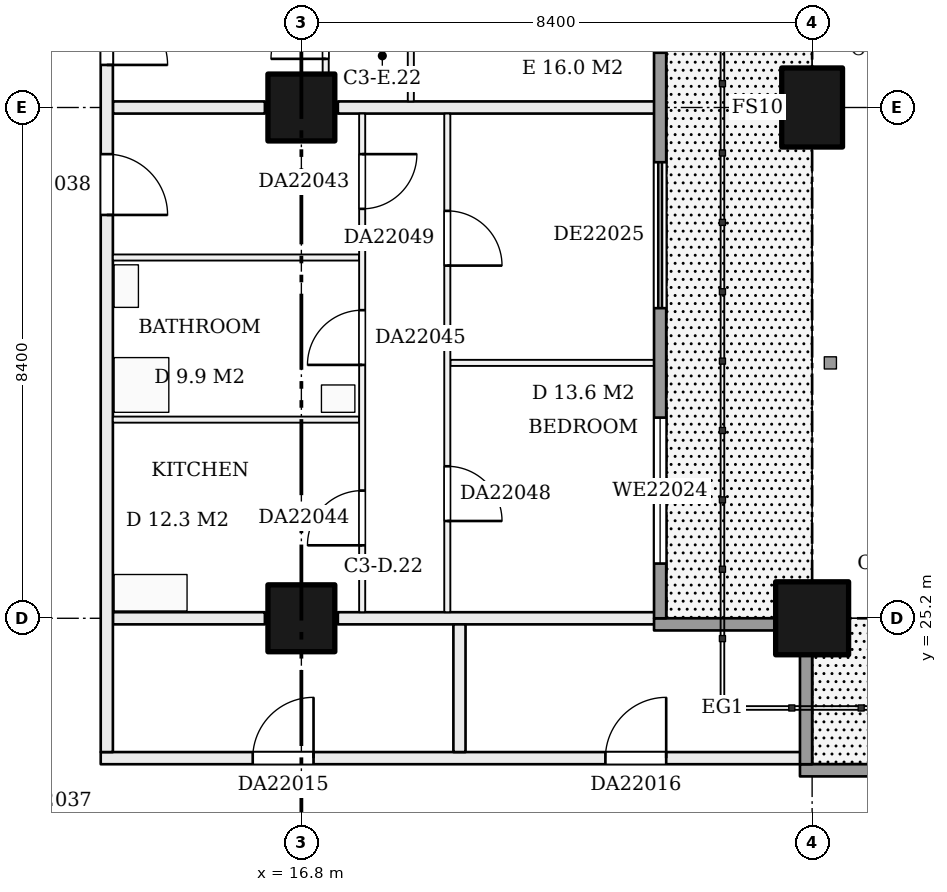
"""IFC4 building model, lengths in metres.
Left out: names, types, materials, properties, quantities, classifications, styles, units other than length and angle.
Written with IfcOpenShell. Run it as: python <this file> out.ifc"""

import sys

from ifc_helpers import new_model, si_unit, direction, frame, frame_2d, origin, origin_2d, place, context, subcontext, project, spatial, rectangle, extrude, element, fill, save


model = new_model("IFC4")
c1 = context("Model", 3, precision=1e-05, world=origin(), true_north=direction((0.0, 1.0)))
c2 = subcontext(c1, "Body", "Model", "MODEL_VIEW")
j1 = project(units=[si_unit("LENGTHUNIT", "METRE"), si_unit("PLANEANGLEUNIT", "RADIAN")], contexts=[c1])
p1 = place(None, origin())
s1 = spatial("IfcSite", under=j1, at=p1, CompositionType="ELEMENT")
p2 = place(p1, origin())
s2 = spatial("IfcBuilding", under=s1, at=p2, CompositionType="ELEMENT")
p3 = place(p2, frame((0.0, 0.0, 91.7)))
s3 = spatial("IfcBuildingStorey", under=s2, at=p3, CompositionType="ELEMENT", Elevation=91.7)
for number, where, z_axis, x_axis in (
    (1, (16.8, 25.2, 0.0), (0.0, 0.0, 1.0), (1.0, 0.0, 0.0)),
    (2, (16.8, 33.6, 0.0), (0.0, 0.0, 1.0), (1.0, 0.0, 0.0)),
):
    element("IfcColumn", number, at=place(p3, frame(where, z_axis=z_axis, x_axis=x_axis)), inside=s3, PredefinedType="COLUMN", context=c2, shape_type="SweptSolid", body=[
        extrude(rectangle(XDim=1.1, YDim=1.1, at=origin_2d()), origin(), (0.0, 0.0, 1.0), 3.22),
    ])
p4 = place(p3, frame((25.2, 25.2, 0.0), z_axis=(0.0, 0.0, 1.0), x_axis=(1.0, 0.0, 0.0)))
e3 = element("IfcColumn", 3, at=p4, inside=s3, PredefinedType="COLUMN", context=c2, shape_type="SweptSolid", body=[
    extrude(rectangle(XDim=1.2, YDim=1.2, at=origin_2d()), origin(), (0.0, 0.0, 1.0), 3.22),
])
p5 = place(p3, frame((25.2, 33.6, 0.0), z_axis=(0.0, 0.0, 1.0), x_axis=(0.0, 1.0, 0.0)))
e4 = element("IfcColumn", 4, at=p5, inside=s3, PredefinedType="COLUMN", context=c2, shape_type="SweptSolid", body=[
    extrude(rectangle(XDim=1.3, YDim=1.0, at=origin_2d()), origin(), (0.0, 0.0, 1.0), 3.22),
])
p6 = place(p3, frame((13.5, 22.9, 0.0), z_axis=(0.0, 0.0, 1.0), x_axis=(1.0, 0.0, 0.0)))
e5 = element("IfcWall", 5, at=p6, inside=s3, PredefinedType="PARTITIONING", context=c2, shape_type="SweptSolid", body=[
    extrude(rectangle(XDim=11.6, YDim=0.2, at=frame_2d((5.8, 0.0))), origin(), (0.0, 0.0, 1.0), 3.22),
])
p7 = place(p6, frame((2.5, 0.0, 0.0)))
e6 = element("IfcOpeningElement", 6, at=p7, cuts=e5, PredefinedType="OPENING", context=c2, shape_type="SweptSolid", body=[
    extrude(rectangle(XDim=1.0, YDim=2.1, at=frame_2d((0.5, 1.05))), frame((0.0, 0.11, 0.0), z_axis=(0.0, -1.0, 0.0), x_axis=(1.0, 0.0, 0.0)), (0.0, 0.0, 1.0), 0.22),
])
p8 = place(p6, frame((8.3, 0.0, 0.0)))
e7 = element("IfcOpeningElement", 7, at=p8, cuts=e5, PredefinedType="OPENING", context=c2, shape_type="SweptSolid", body=[
    extrude(rectangle(XDim=1.0, YDim=2.1, at=frame_2d((0.5, 1.05))), frame((0.0, 0.11, 0.0), z_axis=(0.0, -1.0, 0.0), x_axis=(1.0, 0.0, 0.0)), (0.0, 0.0, 1.0), 0.22),
])
p9 = place(p3, frame((13.7, 25.2, 0.0), z_axis=(0.0, 0.0, 1.0), x_axis=(1.0, 0.0, 0.0)))
e8 = element("IfcWall", 8, at=p9, inside=s3, PredefinedType="PARTITIONING", context=c2, shape_type="SweptSolid", body=[
    extrude(rectangle(XDim=2.5, YDim=0.2, at=frame_2d((1.25, 0.0))), origin(), (0.0, 0.0, 1.0), 3.22),
])
p10 = place(p3, frame((17.4, 25.2, 0.0), z_axis=(0.0, 0.0, 1.0), x_axis=(1.0, 0.0, 0.0)))
e9 = element("IfcWall", 9, at=p10, inside=s3, PredefinedType="PARTITIONING", context=c2, shape_type="SweptSolid", body=[
    extrude(rectangle(XDim=5.3, YDim=0.2, at=frame_2d((2.65, 0.0))), origin(), (0.0, 0.0, 1.0), 3.22),
])
p11 = place(p3, frame((13.7, 28.467, 0.0), z_axis=(0.0, 0.0, 1.0), x_axis=(1.0, 0.0, 0.0)))
e10 = element("IfcWall", 10, at=p11, inside=s3, PredefinedType="PARTITIONING", context=c2, shape_type="SweptSolid", body=[
    extrude(rectangle(XDim=4.05, YDim=0.1, at=frame_2d((2.025, 0.0))), origin(), (0.0, 0.0, 1.0), 3.22),
])
p12 = place(p3, frame((19.25, 29.4, 0.0), z_axis=(0.0, 0.0, 1.0), x_axis=(1.0, 0.0, 0.0)))
e11 = element("IfcWall", 11, at=p12, inside=s3, PredefinedType="PARTITIONING", context=c2, shape_type="SweptSolid", body=[
    extrude(rectangle(XDim=3.45, YDim=0.1, at=frame_2d((1.725, 0.0))), origin(), (0.0, 0.0, 1.0), 3.22),
])
p13 = place(p3, frame((13.7, 31.133, 0.0), z_axis=(0.0, 0.0, 1.0), x_axis=(1.0, 0.0, 0.0)))
e12 = element("IfcWall", 12, at=p13, inside=s3, PredefinedType="PARTITIONING", context=c2, shape_type="SweptSolid", body=[
    extrude(rectangle(XDim=4.05, YDim=0.1, at=frame_2d((2.025, 0.0))), origin(), (0.0, 0.0, 1.0), 3.22),
])
p14 = place(p3, frame((13.7, 33.6, 0.0), z_axis=(0.0, 0.0, 1.0), x_axis=(1.0, 0.0, 0.0)))
e13 = element("IfcWall", 13, at=p14, inside=s3, PredefinedType="PARTITIONING", context=c2, shape_type="SweptSolid", body=[
    extrude(rectangle(XDim=2.5, YDim=0.2, at=frame_2d((1.25, 0.0))), origin(), (0.0, 0.0, 1.0), 3.22),
])
p15 = place(p3, frame((17.4, 33.6, 0.0), z_axis=(0.0, 0.0, 1.0), x_axis=(1.0, 0.0, 0.0)))
e14 = element("IfcWall", 14, at=p15, inside=s3, PredefinedType="PARTITIONING", context=c2, shape_type="SweptSolid", body=[
    extrude(rectangle(XDim=5.3, YDim=0.2, at=frame_2d((2.65, 0.0))), origin(), (0.0, 0.0, 1.0), 3.22),
])
p16 = place(p3, frame((13.6, 23.0, 0.0), z_axis=(0.0, 0.0, 1.0), x_axis=(0.0, 1.0, 0.0)))
e15 = element("IfcWall", 15, at=p16, inside=s3, PredefinedType="PARTITIONING", context=c2, shape_type="SweptSolid", body=[
    extrude(rectangle(XDim=19.0, YDim=0.2, at=frame_2d((9.5, 0.0))), origin(), (0.0, 0.0, 1.0), 3.22),
])
p17 = place(p16, frame((8.833, 0.0, 0.0)))
e16 = element("IfcOpeningElement", 16, at=p17, cuts=e15, PredefinedType="OPENING", context=c2, shape_type="SweptSolid", body=[
    extrude(rectangle(XDim=1.0, YDim=2.1, at=frame_2d((0.5, 1.05))), frame((0.0, 0.11, 0.0), z_axis=(0.0, -1.0, 0.0), x_axis=(1.0, 0.0, 0.0)), (0.0, 0.0, 1.0), 0.22),
])
p18 = place(p16, frame((11.3, 0.0, 0.0)))
e17 = element("IfcOpeningElement", 17, at=p18, cuts=e15, PredefinedType="OPENING", context=c2, shape_type="SweptSolid", body=[
    extrude(rectangle(XDim=1.0, YDim=2.1, at=frame_2d((0.5, 1.05))), frame((0.0, 0.11, 0.0), z_axis=(0.0, -1.0, 0.0), x_axis=(1.0, 0.0, 0.0)), (0.0, 0.0, 1.0), 0.22),
])
p19 = place(p3, frame((17.2, 33.7, 0.0), z_axis=(0.0, 0.0, 1.0), x_axis=(0.0, 1.0, 0.0)))
e18 = element("IfcWall", 18, at=p19, inside=s3, PredefinedType="PARTITIONING", context=c2, shape_type="SweptSolid", body=[
    extrude(rectangle(XDim=8.3, YDim=0.1, at=frame_2d((4.15, 0.0))), origin(), (0.0, 0.0, 1.0), 3.22),
])
p20 = place(p19, frame((0.7, 0.0, 0.0)))
e19 = element("IfcOpeningElement", 19, at=p20, cuts=e18, PredefinedType="OPENING", context=c2, shape_type="SweptSolid", body=[
    extrude(rectangle(XDim=0.9, YDim=2.1, at=frame_2d((0.45, 1.05))), frame((0.0, 0.06, 0.0), z_axis=(0.0, -1.0, 0.0), x_axis=(1.0, 0.0, 0.0)), (0.0, 0.0, 1.0), 0.12),
])
p21 = place(p19, frame((3.567, 0.0, 0.0)))
e20 = element("IfcOpeningElement", 20, at=p21, cuts=e18, PredefinedType="OPENING", context=c2, shape_type="SweptSolid", body=[
    extrude(rectangle(XDim=0.9, YDim=2.1, at=frame_2d((0.45, 1.05))), frame((0.0, 0.06, 0.0), z_axis=(0.0, -1.0, 0.0), x_axis=(1.0, 0.0, 0.0)), (0.0, 0.0, 1.0), 0.12),
])
p22 = place(p19, frame((6.533, 0.0, 0.0)))
e21 = element("IfcOpeningElement", 21, at=p22, cuts=e18, PredefinedType="OPENING", context=c2, shape_type="SweptSolid", body=[
    extrude(rectangle(XDim=0.9, YDim=2.1, at=frame_2d((0.45, 1.05))), frame((0.0, 0.06, 0.0), z_axis=(0.0, -1.0, 0.0), x_axis=(1.0, 0.0, 0.0)), (0.0, 0.0, 1.0), 0.12),
])
p23 = place(p3, frame((17.8, 25.3, 0.0), z_axis=(0.0, 0.0, 1.0), x_axis=(0.0, 1.0, 0.0)))
e22 = element("IfcWall", 22, at=p23, inside=s3, PredefinedType="PARTITIONING", context=c2, shape_type="SweptSolid", body=[
    extrude(rectangle(XDim=8.2, YDim=0.1, at=frame_2d((4.1, 0.0))), origin(), (0.0, 0.0, 1.0), 3.22),
])
p24 = place(p23, frame((6.633, 0.0, 0.0)))
e23 = element("IfcOpeningElement", 23, at=p24, cuts=e22, PredefinedType="OPENING", context=c2, shape_type="SweptSolid", body=[
    extrude(rectangle(XDim=0.9, YDim=2.1, at=frame_2d((0.45, 1.05))), frame((0.0, 0.06, 0.0), z_axis=(0.0, -1.0, 0.0), x_axis=(1.0, 0.0, 0.0)), (0.0, 0.0, 1.0), 0.12),
])
p25 = place(p23, frame((1.1, 0.0, 0.0)))
e24 = element("IfcOpeningElement", 24, at=p25, cuts=e22, PredefinedType="OPENING", context=c2, shape_type="SweptSolid", body=[
    extrude(rectangle(XDim=0.9, YDim=2.1, at=frame_2d((0.45, 1.05))), frame((0.0, 0.06, 0.0), z_axis=(0.0, -1.0, 0.0), x_axis=(1.0, 0.0, 0.0)), (0.0, 0.0, 1.0), 0.12),
])
p26 = place(p23, frame((4.067, 0.0, 0.0)))
e25 = element("IfcOpeningElement", 25, at=p26, cuts=e22, PredefinedType="OPENING", context=c2, shape_type="SweptSolid", body=[
    extrude(rectangle(XDim=0.9, YDim=2.1, at=frame_2d((0.45, 1.05))), frame((0.0, 0.06, 0.0), z_axis=(0.0, -1.0, 0.0), x_axis=(1.0, 0.0, 0.0)), (0.0, 0.0, 1.0), 0.12),
])
p27 = place(p3, frame((18.6, 33.7, 0.0), z_axis=(0.0, 0.0, 1.0), x_axis=(0.0, 1.0, 0.0)))
e26 = element("IfcWall", 26, at=p27, inside=s3, PredefinedType="PARTITIONING", context=c2, shape_type="SweptSolid", body=[
    extrude(rectangle(XDim=8.3, YDim=0.1, at=frame_2d((4.15, 0.0))), origin(), (0.0, 0.0, 1.0), 3.22),
])
p28 = place(p27, frame((1.5, 0.0, 0.0)))
e27 = element("IfcOpeningElement", 27, at=p28, cuts=e26, PredefinedType="OPENING", context=c2, shape_type="SweptSolid", body=[
    extrude(rectangle(XDim=0.9, YDim=2.1, at=frame_2d((0.45, 1.05))), frame((0.0, 0.06, 0.0), z_axis=(0.0, -1.0, 0.0), x_axis=(1.0, 0.0, 0.0)), (0.0, 0.0, 1.0), 0.12),
])
p29 = place(p27, frame((5.7, 0.0, 0.0)))
e28 = element("IfcOpeningElement", 28, at=p29, cuts=e26, PredefinedType="OPENING", context=c2, shape_type="SweptSolid", body=[
    extrude(rectangle(XDim=0.9, YDim=2.1, at=frame_2d((0.45, 1.05))), frame((0.0, 0.06, 0.0), z_axis=(0.0, -1.0, 0.0), x_axis=(1.0, 0.0, 0.0)), (0.0, 0.0, 1.0), 0.12),
])
p30 = place(p3, frame((19.2, 25.3, 0.0), z_axis=(0.0, 0.0, 1.0), x_axis=(0.0, 1.0, 0.0)))
e29 = element("IfcWall", 29, at=p30, inside=s3, PredefinedType="PARTITIONING", context=c2, shape_type="SweptSolid", body=[
    extrude(rectangle(XDim=8.2, YDim=0.1, at=frame_2d((4.1, 0.0))), origin(), (0.0, 0.0, 1.0), 3.22),
])
p31 = place(p30, frame((1.5, 0.0, 0.0)))
e30 = element("IfcOpeningElement", 30, at=p31, cuts=e29, PredefinedType="OPENING", context=c2, shape_type="SweptSolid", body=[
    extrude(rectangle(XDim=0.9, YDim=2.1, at=frame_2d((0.45, 1.05))), frame((0.0, 0.06, 0.0), z_axis=(0.0, -1.0, 0.0), x_axis=(1.0, 0.0, 0.0)), (0.0, 0.0, 1.0), 0.12),
])
p32 = place(p30, frame((5.7, 0.0, 0.0)))
e31 = element("IfcOpeningElement", 31, at=p32, cuts=e29, PredefinedType="OPENING", context=c2, shape_type="SweptSolid", body=[
    extrude(rectangle(XDim=0.9, YDim=2.1, at=frame_2d((0.45, 1.05))), frame((0.0, 0.06, 0.0), z_axis=(0.0, -1.0, 0.0), x_axis=(1.0, 0.0, 0.0)), (0.0, 0.0, 1.0), 0.12),
])
p33 = place(p3, frame((19.4, 23.0, 0.0), z_axis=(0.0, 0.0, 1.0), x_axis=(0.0, 1.0, 0.0)))
e32 = element("IfcWall", 32, at=p33, inside=s3, PredefinedType="PARTITIONING", context=c2, shape_type="SweptSolid", body=[
    extrude(rectangle(XDim=2.1, YDim=0.2, at=frame_2d((1.05, 0.0))), origin(), (0.0, 0.0, 1.0), 3.22),
])
p34 = place(p3, frame((42.0, 22.7, 0.0), z_axis=(0.0, 0.0, 1.0), x_axis=(-1.0, 0.0, 0.0)))
e33 = element("IfcWall", 33, at=p34, inside=s3, PredefinedType="SOLIDWALL", context=c2, shape_type="SweptSolid", body=[
    extrude(rectangle(XDim=17.0, YDim=0.2, at=frame_2d((8.5, 0.0))), origin(), (0.0, 0.0, 1.0), 3.22),
])
p35 = place(p34, frame((9.6, 0.0, 0.0)))
e34 = element("IfcOpeningElement", 34, at=p35, cuts=e33, PredefinedType="OPENING", context=c2, shape_type="SweptSolid", body=[
    extrude(rectangle(XDim=1.8, YDim=2.4, at=frame_2d((0.9, 1.2))), frame((0.0, 0.11, 0.0), z_axis=(0.0, -1.0, 0.0), x_axis=(1.0, 0.0, 0.0)), (0.0, 0.0, 1.0), 0.22),
])
p36 = place(p3, frame((25.1, 22.8, 0.0), z_axis=(0.0, 0.0, 1.0), x_axis=(0.0, 1.0, 0.0)))
e35 = element("IfcWall", 35, at=p36, inside=s3, PredefinedType="SOLIDWALL", context=c2, shape_type="SweptSolid", body=[
    extrude(rectangle(XDim=1.8, YDim=0.2, at=frame_2d((0.9, 0.0))), origin(), (0.0, 0.0, 1.0), 3.22),
])
p37 = place(p3, frame((24.6, 25.1, 0.0), z_axis=(0.0, 0.0, 1.0), x_axis=(-1.0, 0.0, 0.0)))
e36 = element("IfcWall", 36, at=p37, inside=s3, PredefinedType="SOLIDWALL", context=c2, shape_type="SweptSolid", body=[
    extrude(rectangle(XDim=2.0, YDim=0.2, at=frame_2d((1.0, 0.0))), origin(), (0.0, 0.0, 1.0), 3.22),
])
p38 = place(p3, frame((22.7, 25.2, 0.0), z_axis=(0.0, 0.0, 1.0), x_axis=(0.0, 1.0, 0.0)))
e37 = element("IfcWall", 37, at=p38, inside=s3, PredefinedType="SOLIDWALL", context=c2, shape_type="SweptSolid", body=[
    extrude(rectangle(XDim=16.8, YDim=0.2, at=frame_2d((8.4, 0.0))), origin(), (0.0, 0.0, 1.0), 3.22),
])
p39 = place(p38, frame((0.9, 0.0, 0.9)))
e38 = element("IfcOpeningElement", 38, at=p39, cuts=e37, PredefinedType="OPENING", context=c2, shape_type="SweptSolid", body=[
    extrude(rectangle(XDim=2.4, YDim=1.5, at=frame_2d((1.2, 0.75))), frame((0.0, 0.11, 0.0), z_axis=(0.0, -1.0, 0.0), x_axis=(1.0, 0.0, 0.0)), (0.0, 0.0, 1.0), 0.22),
])
p40 = place(p38, frame((5.1, 0.0, 0.0)))
e39 = element("IfcOpeningElement", 39, at=p40, cuts=e37, PredefinedType="OPENING", context=c2, shape_type="SweptSolid", body=[
    extrude(rectangle(XDim=2.4, YDim=2.2, at=frame_2d((1.2, 1.1))), frame((0.0, 0.11, 0.0), z_axis=(0.0, -1.0, 0.0), x_axis=(1.0, 0.0, 0.0)), (0.0, 0.0, 1.0), 0.22),
])
p41 = place(p38, frame((9.3, 0.0, 0.9)))
e40 = element("IfcOpeningElement", 40, at=p41, cuts=e37, PredefinedType="OPENING", context=c2, shape_type="SweptSolid", body=[
    extrude(rectangle(XDim=2.4, YDim=1.5, at=frame_2d((1.2, 0.75))), frame((0.0, 0.11, 0.0), z_axis=(0.0, -1.0, 0.0), x_axis=(1.0, 0.0, 0.0)), (0.0, 0.0, 1.0), 0.22),
])
p42 = place(p38, frame((13.5, 0.0, 0.0)))
e41 = element("IfcOpeningElement", 41, at=p42, cuts=e37, PredefinedType="OPENING", context=c2, shape_type="SweptSolid", body=[
    extrude(rectangle(XDim=2.4, YDim=2.2, at=frame_2d((1.2, 1.1))), frame((0.0, 0.11, 0.0), z_axis=(0.0, -1.0, 0.0), x_axis=(1.0, 0.0, 0.0)), (0.0, 0.0, 1.0), 0.22),
])
p43 = place(p7, origin())
e42 = element("IfcDoor", 42, at=p43, inside=s3, OperationType="SINGLE_SWING_RIGHT", PredefinedType="DOOR", context=c2, shape_type="SweptSolid", body=[
    extrude(rectangle(XDim=1.0, YDim=2.1, at=frame_2d((0.5, 1.05))), frame((0.0, 0.025, 0.0), z_axis=(0.0, -1.0, 0.0), x_axis=(1.0, 0.0, 0.0)), (0.0, 0.0, 1.0), 0.05),
])
fill(e6, e42)
p44 = place(p8, origin())
e43 = element("IfcDoor", 43, at=p44, inside=s3, OperationType="SINGLE_SWING_RIGHT", PredefinedType="DOOR", context=c2, shape_type="SweptSolid", body=[
    extrude(rectangle(XDim=1.0, YDim=2.1, at=frame_2d((0.5, 1.05))), frame((0.0, 0.025, 0.0), z_axis=(0.0, -1.0, 0.0), x_axis=(1.0, 0.0, 0.0)), (0.0, 0.0, 1.0), 0.05),
])
fill(e7, e43)
p45 = place(p17, frame((1.0, 0.0, 0.0), z_axis=(0.0, 0.0, 1.0), x_axis=(-1.0, 0.0, 0.0)))
e44 = element("IfcDoor", 44, at=p45, inside=s3, OperationType="SINGLE_SWING_RIGHT", PredefinedType="DOOR", context=c2, shape_type="SweptSolid", body=[
    extrude(rectangle(XDim=1.0, YDim=2.1, at=frame_2d((0.5, 1.05))), frame((0.0, 0.025, 0.0), z_axis=(0.0, -1.0, 0.0), x_axis=(1.0, 0.0, 0.0)), (0.0, 0.0, 1.0), 0.05),
])
fill(e16, e44)
p46 = place(p18, frame((1.0, 0.0, 0.0), z_axis=(0.0, 0.0, 1.0), x_axis=(-1.0, 0.0, 0.0)))
e45 = element("IfcDoor", 45, at=p46, inside=s3, OperationType="SINGLE_SWING_RIGHT", PredefinedType="DOOR", context=c2, shape_type="SweptSolid", body=[
    extrude(rectangle(XDim=1.0, YDim=2.1, at=frame_2d((0.5, 1.05))), frame((0.0, 0.025, 0.0), z_axis=(0.0, -1.0, 0.0), x_axis=(1.0, 0.0, 0.0)), (0.0, 0.0, 1.0), 0.05),
])
fill(e17, e45)
p47 = place(p20, origin())
e46 = element("IfcDoor", 46, at=p47, inside=s3, OperationType="SINGLE_SWING_LEFT", PredefinedType="DOOR", context=c2, shape_type="SweptSolid", body=[
    extrude(rectangle(XDim=0.9, YDim=2.1, at=frame_2d((0.45, 1.05))), frame((0.0, 0.025, 0.0), z_axis=(0.0, -1.0, 0.0), x_axis=(1.0, 0.0, 0.0)), (0.0, 0.0, 1.0), 0.05),
])
fill(e19, e46)
p48 = place(p24, frame((0.9, 0.0, 0.0), z_axis=(0.0, 0.0, 1.0), x_axis=(-1.0, 0.0, 0.0)))
e47 = element("IfcDoor", 47, at=p48, inside=s3, OperationType="SINGLE_SWING_LEFT", PredefinedType="DOOR", context=c2, shape_type="SweptSolid", body=[
    extrude(rectangle(XDim=0.9, YDim=2.1, at=frame_2d((0.45, 1.05))), frame((0.0, 0.025, 0.0), z_axis=(0.0, -1.0, 0.0), x_axis=(1.0, 0.0, 0.0)), (0.0, 0.0, 1.0), 0.05),
])
fill(e23, e47)
p49 = place(p25, origin())
e48 = element("IfcDoor", 48, at=p49, inside=s3, OperationType="SINGLE_SWING_LEFT", PredefinedType="DOOR", context=c2, shape_type="SweptSolid", body=[
    extrude(rectangle(XDim=0.9, YDim=2.1, at=frame_2d((0.45, 1.05))), frame((0.0, 0.025, 0.0), z_axis=(0.0, -1.0, 0.0), x_axis=(1.0, 0.0, 0.0)), (0.0, 0.0, 1.0), 0.05),
])
fill(e24, e48)
p50 = place(p26, origin())
e49 = element("IfcDoor", 49, at=p50, inside=s3, OperationType="SINGLE_SWING_LEFT", PredefinedType="DOOR", context=c2, shape_type="SweptSolid", body=[
    extrude(rectangle(XDim=0.9, YDim=2.1, at=frame_2d((0.45, 1.05))), frame((0.0, 0.025, 0.0), z_axis=(0.0, -1.0, 0.0), x_axis=(1.0, 0.0, 0.0)), (0.0, 0.0, 1.0), 0.05),
])
fill(e25, e49)
p51 = place(p31, frame((0.9, 0.0, 0.0), z_axis=(0.0, 0.0, 1.0), x_axis=(-1.0, 0.0, 0.0)))
e50 = element("IfcDoor", 50, at=p51, inside=s3, OperationType="SINGLE_SWING_RIGHT", PredefinedType="DOOR", context=c2, shape_type="SweptSolid", body=[
    extrude(rectangle(XDim=0.9, YDim=2.1, at=frame_2d((0.45, 1.05))), frame((0.0, 0.025, 0.0), z_axis=(0.0, -1.0, 0.0), x_axis=(1.0, 0.0, 0.0)), (0.0, 0.0, 1.0), 0.05),
])
fill(e30, e50)
p52 = place(p32, frame((0.9, 0.0, 0.0), z_axis=(0.0, 0.0, 1.0), x_axis=(-1.0, 0.0, 0.0)))
e51 = element("IfcDoor", 51, at=p52, inside=s3, OperationType="SINGLE_SWING_RIGHT", PredefinedType="DOOR", context=c2, shape_type="SweptSolid", body=[
    extrude(rectangle(XDim=0.9, YDim=2.1, at=frame_2d((0.45, 1.05))), frame((0.0, 0.025, 0.0), z_axis=(0.0, -1.0, 0.0), x_axis=(1.0, 0.0, 0.0)), (0.0, 0.0, 1.0), 0.05),
])
fill(e31, e51)
p53 = place(p39, origin())
e52 = element("IfcWindow", 52, at=p53, inside=s3, PartitioningType="SINGLE_PANEL", PredefinedType="WINDOW", context=c2, shape_type="SweptSolid", body=[
    extrude(rectangle(XDim=2.4, YDim=1.5, at=frame_2d((1.2, 0.75))), frame((0.0, 0.03, 0.0), z_axis=(0.0, -1.0, 0.0), x_axis=(1.0, 0.0, 0.0)), (0.0, 0.0, 1.0), 0.06),
])
fill(e38, e52)
p54 = place(p40, origin())
e53 = element("IfcDoor", 53, at=p54, inside=s3, OperationType="DOUBLE_DOOR_SLIDING", PredefinedType="DOOR", context=c2, shape_type="SweptSolid", body=[
    extrude(rectangle(XDim=2.4, YDim=2.2, at=frame_2d((1.2, 1.1))), frame((0.0, 0.025, 0.0), z_axis=(0.0, -1.0, 0.0), x_axis=(1.0, 0.0, 0.0)), (0.0, 0.0, 1.0), 0.05),
])
fill(e39, e53)
save(model, sys.argv[1])
